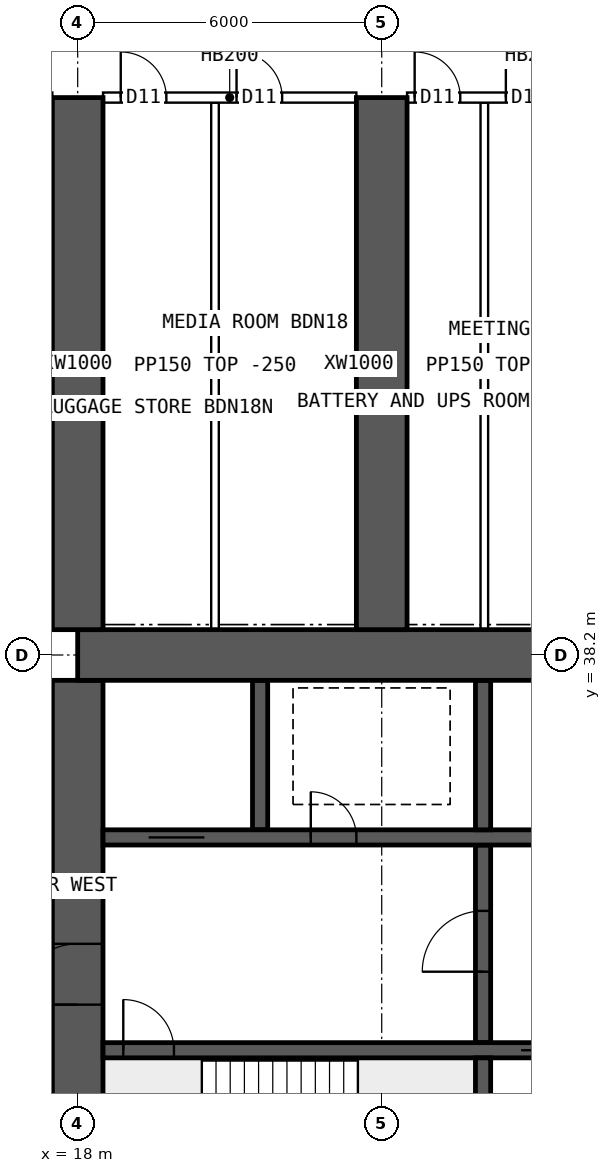
"""IFC4 building model, lengths in metres.
Left out: names, types, materials, properties, quantities, classifications, styles, units other than length and angle.
Written with IfcOpenShell. Run it as: python <this file> out.ifc"""

import sys

from ifc_helpers import new_model, si_unit, direction, frame, frame_2d, origin, place, context, subcontext, project, spatial, rectangle, extrude, element, fill, save


model = new_model("IFC4")
c1 = context("Model", 3, precision=1e-05, world=origin(), true_north=direction((0.0, 1.0)))
c2 = subcontext(c1, "Body", "Model", "MODEL_VIEW")
j1 = project(units=[si_unit("LENGTHUNIT", "METRE"), si_unit("PLANEANGLEUNIT", "RADIAN")], contexts=[c1])
p1 = place(None, origin())
s1 = spatial("IfcSite", under=j1, at=p1, CompositionType="ELEMENT")
p2 = place(p1, origin())
s2 = spatial("IfcBuilding", under=s1, at=p2, CompositionType="ELEMENT")
p3 = place(p2, frame((0.0, 0.0, 16.0)))
s3 = spatial("IfcBuildingStorey", under=s2, at=p3, CompositionType="ELEMENT", Elevation=16.0)
p4 = place(p3, frame((18.0, 38.2, 0.0), z_axis=(0.0, 0.0, 1.0), x_axis=(1.0, 0.0, 0.0)))
e1 = element("IfcWall", 1, at=p4, inside=s3, PredefinedType="SHEAR", context=c2, shape_type="SweptSolid", body=[
    extrude(rectangle(XDim=48.0, YDim=1.0, at=frame_2d((24.0, 0.0))), origin(), (0.0, 0.0, 1.0), 4.2),
])
p5 = place(p3, frame((18.0, 26.3, 0.0), z_axis=(0.0, 0.0, 1.0), x_axis=(0.0, 1.0, 0.0)))
e2 = element("IfcWall", 2, at=p5, inside=s3, PredefinedType="SHEAR", context=c2, shape_type="SweptSolid", body=[
    extrude(rectangle(XDim=11.4, YDim=1.0, at=frame_2d((5.7, 0.0))), origin(), (0.0, 0.0, 1.0), 4.2),
])
p6 = place(p5, frame((5.0, 0.0, 0.0)))
e3 = element("IfcOpeningElement", 3, at=p6, cuts=e2, PredefinedType="OPENING", context=c2, shape_type="SweptSolid", body=[
    extrude(rectangle(XDim=1.2, YDim=2.1, at=frame_2d((0.6, 1.05))), frame((0.0, 0.51, 0.0), z_axis=(0.0, -1.0, 0.0), x_axis=(1.0, 0.0, 0.0)), (0.0, 0.0, 1.0), 1.02),
])
p7 = place(p3, frame((18.5, 30.4, 0.0), z_axis=(0.0, 0.0, 1.0), x_axis=(1.0, 0.0, 0.0)))
e4 = element("IfcWall", 4, at=p7, inside=s3, PredefinedType="SHEAR", context=c2, shape_type="SweptSolid", body=[
    extrude(rectangle(XDim=47.0, YDim=0.3, at=frame_2d((23.5, 0.0))), origin(), (0.0, 0.0, 1.0), 4.2),
])
p8 = place(p7, frame((0.4, 0.0, 0.0)))
e5 = element("IfcOpeningElement", 5, at=p8, cuts=e4, PredefinedType="OPENING", context=c2, shape_type="SweptSolid", body=[
    extrude(rectangle(XDim=1.0, YDim=2.1, at=frame_2d((0.5, 1.05))), frame((0.0, 0.16, 0.0), z_axis=(0.0, -1.0, 0.0), x_axis=(1.0, 0.0, 0.0)), (0.0, 0.0, 1.0), 0.32),
])
p9 = place(p7, frame((45.6, 0.0, 0.0)))
e6 = element("IfcOpeningElement", 6, at=p9, cuts=e4, PredefinedType="OPENING", context=c2, shape_type="SweptSolid", body=[
    extrude(rectangle(XDim=1.0, YDim=2.1, at=frame_2d((0.5, 1.05))), frame((0.0, 0.16, 0.0), z_axis=(0.0, -1.0, 0.0), x_axis=(1.0, 0.0, 0.0)), (0.0, 0.0, 1.0), 0.32),
])
p10 = place(p7, frame((8.25, 0.0, 0.0)))
e7 = element("IfcOpeningElement", 7, at=p10, cuts=e4, PredefinedType="OPENING", context=c2, shape_type="SweptSolid", body=[
    extrude(rectangle(XDim=1.1, YDim=2.1, at=frame_2d((0.55, 1.05))), frame((0.0, 0.16, 0.0), z_axis=(0.0, -1.0, 0.0), x_axis=(1.0, 0.0, 0.0)), (0.0, 0.0, 1.0), 0.32),
])
p11 = place(p7, frame((10.85, 0.0, 0.0)))
e8 = element("IfcOpeningElement", 8, at=p11, cuts=e4, PredefinedType="OPENING", context=c2, shape_type="SweptSolid", body=[
    extrude(rectangle(XDim=1.1, YDim=2.1, at=frame_2d((0.55, 1.05))), frame((0.0, 0.16, 0.0), z_axis=(0.0, -1.0, 0.0), x_axis=(1.0, 0.0, 0.0)), (0.0, 0.0, 1.0), 0.32),
])
p12 = place(p7, frame((13.45, 0.0, 0.0)))
e9 = element("IfcOpeningElement", 9, at=p12, cuts=e4, PredefinedType="OPENING", context=c2, shape_type="SweptSolid", body=[
    extrude(rectangle(XDim=1.1, YDim=2.1, at=frame_2d((0.55, 1.05))), frame((0.0, 0.16, 0.0), z_axis=(0.0, -1.0, 0.0), x_axis=(1.0, 0.0, 0.0)), (0.0, 0.0, 1.0), 0.32),
])
p13 = place(p7, frame((16.05, 0.0, 0.0)))
e10 = element("IfcOpeningElement", 10, at=p13, cuts=e4, PredefinedType="OPENING", context=c2, shape_type="SweptSolid", body=[
    extrude(rectangle(XDim=1.1, YDim=2.1, at=frame_2d((0.55, 1.05))), frame((0.0, 0.16, 0.0), z_axis=(0.0, -1.0, 0.0), x_axis=(1.0, 0.0, 0.0)), (0.0, 0.0, 1.0), 0.32),
])
p14 = place(p7, frame((30.117, 0.0, 0.0)))
e11 = element("IfcOpeningElement", 11, at=p14, cuts=e4, PredefinedType="OPENING", context=c2, shape_type="SweptSolid", body=[
    extrude(rectangle(XDim=1.1, YDim=2.1, at=frame_2d((0.55, 1.05))), frame((0.0, 0.16, 0.0), z_axis=(0.0, -1.0, 0.0), x_axis=(1.0, 0.0, 0.0)), (0.0, 0.0, 1.0), 0.32),
])
p15 = place(p7, frame((33.65, 0.0, 0.0)))
e12 = element("IfcOpeningElement", 12, at=p15, cuts=e4, PredefinedType="OPENING", context=c2, shape_type="SweptSolid", body=[
    extrude(rectangle(XDim=1.1, YDim=2.1, at=frame_2d((0.55, 1.05))), frame((0.0, 0.16, 0.0), z_axis=(0.0, -1.0, 0.0), x_axis=(1.0, 0.0, 0.0)), (0.0, 0.0, 1.0), 0.32),
])
p16 = place(p7, frame((37.183, 0.0, 0.0)))
e13 = element("IfcOpeningElement", 13, at=p16, cuts=e4, PredefinedType="OPENING", context=c2, shape_type="SweptSolid", body=[
    extrude(rectangle(XDim=1.1, YDim=2.1, at=frame_2d((0.55, 1.05))), frame((0.0, 0.16, 0.0), z_axis=(0.0, -1.0, 0.0), x_axis=(1.0, 0.0, 0.0)), (0.0, 0.0, 1.0), 0.32),
])
p17 = place(p3, frame((18.5, 34.6, 0.0), z_axis=(0.0, 0.0, 1.0), x_axis=(1.0, 0.0, 0.0)))
e14 = element("IfcWall", 14, at=p17, inside=s3, PredefinedType="SHEAR", context=c2, shape_type="SweptSolid", body=[
    extrude(rectangle(XDim=47.0, YDim=0.3, at=frame_2d((23.5, 0.0))), origin(), (0.0, 0.0, 1.0), 4.2),
])
p18 = place(p17, frame((0.9, 0.0, 0.0)))
e15 = element("IfcOpeningElement", 15, at=p18, cuts=e14, PredefinedType="OPENING", context=c2, shape_type="SweptSolid", body=[
    extrude(rectangle(XDim=1.1, YDim=2.1, at=frame_2d((0.55, 1.05))), frame((0.0, 0.16, 0.0), z_axis=(0.0, -1.0, 0.0), x_axis=(1.0, 0.0, 0.0)), (0.0, 0.0, 1.0), 0.32),
])
p19 = place(p17, frame((45.0, 0.0, 0.0)))
e16 = element("IfcOpeningElement", 16, at=p19, cuts=e14, PredefinedType="OPENING", context=c2, shape_type="SweptSolid", body=[
    extrude(rectangle(XDim=1.1, YDim=2.1, at=frame_2d((0.55, 1.05))), frame((0.0, 0.16, 0.0), z_axis=(0.0, -1.0, 0.0), x_axis=(1.0, 0.0, 0.0)), (0.0, 0.0, 1.0), 0.32),
])
p20 = place(p17, frame((4.1, 0.0, 0.0)))
e17 = element("IfcOpeningElement", 17, at=p20, cuts=e14, PredefinedType="OPENING", context=c2, shape_type="SweptSolid", body=[
    extrude(rectangle(XDim=0.9, YDim=2.1, at=frame_2d((0.45, 1.05))), frame((0.0, 0.16, 0.0), z_axis=(0.0, -1.0, 0.0), x_axis=(1.0, 0.0, 0.0)), (0.0, 0.0, 1.0), 0.32),
])
p21 = place(p17, frame((42.0, 0.0, 0.0)))
e18 = element("IfcOpeningElement", 18, at=p21, cuts=e14, PredefinedType="OPENING", context=c2, shape_type="SweptSolid", body=[
    extrude(rectangle(XDim=0.9, YDim=2.1, at=frame_2d((0.45, 1.05))), frame((0.0, 0.16, 0.0), z_axis=(0.0, -1.0, 0.0), x_axis=(1.0, 0.0, 0.0)), (0.0, 0.0, 1.0), 0.32),
])
p22 = place(p17, frame((8.875, 0.0, 0.0)))
e19 = element("IfcOpeningElement", 19, at=p22, cuts=e14, PredefinedType="OPENING", context=c2, shape_type="SweptSolid", body=[
    extrude(rectangle(XDim=0.9, YDim=2.1, at=frame_2d((0.45, 1.05))), frame((0.0, 0.16, 0.0), z_axis=(0.0, -1.0, 0.0), x_axis=(1.0, 0.0, 0.0)), (0.0, 0.0, 1.0), 0.32),
])
p23 = place(p17, frame((12.849, 0.0, 0.0)))
e20 = element("IfcOpeningElement", 20, at=p23, cuts=e14, PredefinedType="OPENING", context=c2, shape_type="SweptSolid", body=[
    extrude(rectangle(XDim=0.9, YDim=2.1, at=frame_2d((0.45, 1.05))), frame((0.0, 0.16, 0.0), z_axis=(0.0, -1.0, 0.0), x_axis=(1.0, 0.0, 0.0)), (0.0, 0.0, 1.0), 0.32),
])
p24 = place(p17, frame((16.496, 0.0, 0.0)))
e21 = element("IfcOpeningElement", 21, at=p24, cuts=e14, PredefinedType="OPENING", context=c2, shape_type="SweptSolid", body=[
    extrude(rectangle(XDim=0.9, YDim=2.1, at=frame_2d((0.45, 1.05))), frame((0.0, 0.16, 0.0), z_axis=(0.0, -1.0, 0.0), x_axis=(1.0, 0.0, 0.0)), (0.0, 0.0, 1.0), 0.32),
])
p25 = place(p17, frame((20.255, 0.0, 0.0)))
e22 = element("IfcOpeningElement", 22, at=p25, cuts=e14, PredefinedType="OPENING", context=c2, shape_type="SweptSolid", body=[
    extrude(rectangle(XDim=0.9, YDim=2.1, at=frame_2d((0.45, 1.05))), frame((0.0, 0.16, 0.0), z_axis=(0.0, -1.0, 0.0), x_axis=(1.0, 0.0, 0.0)), (0.0, 0.0, 1.0), 0.32),
])
p26 = place(p17, frame((24.661, 0.0, 0.0)))
e23 = element("IfcOpeningElement", 23, at=p26, cuts=e14, PredefinedType="OPENING", context=c2, shape_type="SweptSolid", body=[
    extrude(rectangle(XDim=0.9, YDim=2.1, at=frame_2d((0.45, 1.05))), frame((0.0, 0.16, 0.0), z_axis=(0.0, -1.0, 0.0), x_axis=(1.0, 0.0, 0.0)), (0.0, 0.0, 1.0), 0.32),
])
p27 = place(p17, frame((27.458, 0.0, 0.0)))
e24 = element("IfcOpeningElement", 24, at=p27, cuts=e14, PredefinedType="OPENING", context=c2, shape_type="SweptSolid", body=[
    extrude(rectangle(XDim=0.9, YDim=2.1, at=frame_2d((0.45, 1.05))), frame((0.0, 0.16, 0.0), z_axis=(0.0, -1.0, 0.0), x_axis=(1.0, 0.0, 0.0)), (0.0, 0.0, 1.0), 0.32),
])
p28 = place(p17, frame((29.831, 0.0, 0.0)))
e25 = element("IfcOpeningElement", 25, at=p28, cuts=e14, PredefinedType="OPENING", context=c2, shape_type="SweptSolid", body=[
    extrude(rectangle(XDim=0.9, YDim=2.1, at=frame_2d((0.45, 1.05))), frame((0.0, 0.16, 0.0), z_axis=(0.0, -1.0, 0.0), x_axis=(1.0, 0.0, 0.0)), (0.0, 0.0, 1.0), 0.32),
])
p29 = place(p17, frame((35.302, 0.0, 0.0)))
e26 = element("IfcOpeningElement", 26, at=p29, cuts=e14, PredefinedType="OPENING", context=c2, shape_type="SweptSolid", body=[
    extrude(rectangle(XDim=0.9, YDim=2.1, at=frame_2d((0.45, 1.05))), frame((0.0, 0.16, 0.0), z_axis=(0.0, -1.0, 0.0), x_axis=(1.0, 0.0, 0.0)), (0.0, 0.0, 1.0), 0.32),
])
p30 = place(p3, frame((26.0, 26.3, 0.0), z_axis=(0.0, 0.0, 1.0), x_axis=(0.0, 1.0, 0.0)))
e27 = element("IfcWall", 27, at=p30, inside=s3, PredefinedType="SHEAR", context=c2, shape_type="SweptSolid", body=[
    extrude(rectangle(XDim=3.95, YDim=0.3, at=frame_2d((1.975, 0.0))), origin(), (0.0, 0.0, 1.0), 4.2),
])
p31 = place(p3, frame((26.0, 30.55, 0.0), z_axis=(0.0, 0.0, 1.0), x_axis=(0.0, 1.0, 0.0)))
e28 = element("IfcWall", 28, at=p31, inside=s3, PredefinedType="SHEAR", context=c2, shape_type="SweptSolid", body=[
    extrude(rectangle(XDim=3.9, YDim=0.3, at=frame_2d((1.95, 0.0))), origin(), (0.0, 0.0, 1.0), 4.2),
])
p32 = place(p31, frame((1.4, 0.0, 0.0)))
e29 = element("IfcOpeningElement", 29, at=p32, cuts=e28, PredefinedType="OPENING", context=c2, shape_type="SweptSolid", body=[
    extrude(rectangle(XDim=1.2, YDim=2.1, at=frame_2d((0.6, 1.05))), frame((0.0, 0.16, 0.0), z_axis=(0.0, -1.0, 0.0), x_axis=(1.0, 0.0, 0.0)), (0.0, 0.0, 1.0), 0.32),
])
for number, where, z_axis, x_axis in (
    (30, (21.6, 34.75, 0.0), (0.0, 0.0, 1.0), (0.0, 1.0, 0.0)),
    (31, (26.0, 34.75, 0.0), (0.0, 0.0, 1.0), (0.0, 1.0, 0.0)),
):
    element("IfcWall", number, at=place(p3, frame(where, z_axis=z_axis, x_axis=x_axis)), inside=s3, PredefinedType="SHEAR", context=c2, shape_type="SweptSolid", body=[
        extrude(rectangle(XDim=2.95, YDim=0.3, at=frame_2d((1.475, 0.0))), origin(), (0.0, 0.0, 1.0), 4.2),
    ])
for number, where, z_axis, x_axis in (
    (32, (18.0, 38.7, 0.0), (0.0, 0.0, 1.0), (0.0, 1.0, 0.0)),
    (33, (24.0, 38.7, 0.0), (0.0, 0.0, 1.0), (0.0, 1.0, 0.0)),
):
    element("IfcWall", number, at=place(p3, frame(where, z_axis=z_axis, x_axis=x_axis)), inside=s3, PredefinedType="SHEAR", context=c2, shape_type="SweptSolid", body=[
        extrude(rectangle(XDim=10.5, YDim=1.0, at=frame_2d((5.25, 0.0))), origin(), (0.0, 0.0, 1.0), 4.2),
    ])
p33 = place(p3, frame((18.5, 49.2, 0.0), z_axis=(0.0, 0.0, 1.0), x_axis=(1.0, 0.0, 0.0)))
e34 = element("IfcWall", 34, at=p33, inside=s3, PredefinedType="SOLIDWALL", context=c2, shape_type="SweptSolid", body=[
    extrude(rectangle(XDim=5.0, YDim=0.2, at=frame_2d((2.5, 0.0))), origin(), (0.0, 0.0, 1.0), 3.95),
])
p34 = place(p33, frame((0.35, 0.0, 0.0)))
e35 = element("IfcOpeningElement", 35, at=p34, cuts=e34, PredefinedType="OPENING", context=c2, shape_type="SweptSolid", body=[
    extrude(rectangle(XDim=0.9, YDim=2.1, at=frame_2d((0.45, 1.05))), frame((0.0, 0.11, 0.0), z_axis=(0.0, -1.0, 0.0), x_axis=(1.0, 0.0, 0.0)), (0.0, 0.0, 1.0), 0.22),
])
p35 = place(p33, frame((2.635, 0.0, 0.0)))
e36 = element("IfcOpeningElement", 36, at=p35, cuts=e34, PredefinedType="OPENING", context=c2, shape_type="SweptSolid", body=[
    extrude(rectangle(XDim=0.9, YDim=2.1, at=frame_2d((0.45, 1.05))), frame((0.0, 0.11, 0.0), z_axis=(0.0, -1.0, 0.0), x_axis=(1.0, 0.0, 0.0)), (0.0, 0.0, 1.0), 0.22),
])
p36 = place(p3, frame((24.5, 49.2, 0.0), z_axis=(0.0, 0.0, 1.0), x_axis=(1.0, 0.0, 0.0)))
e37 = element("IfcWall", 37, at=p36, inside=s3, PredefinedType="SOLIDWALL", context=c2, shape_type="SweptSolid", body=[
    extrude(rectangle(XDim=5.0, YDim=0.2, at=frame_2d((2.5, 0.0))), origin(), (0.0, 0.0, 1.0), 3.95),
])
p37 = place(p36, frame((0.15, 0.0, 0.0)))
e38 = element("IfcOpeningElement", 38, at=p37, cuts=e37, PredefinedType="OPENING", context=c2, shape_type="SweptSolid", body=[
    extrude(rectangle(XDim=0.9, YDim=2.1, at=frame_2d((0.45, 1.05))), frame((0.0, 0.11, 0.0), z_axis=(0.0, -1.0, 0.0), x_axis=(1.0, 0.0, 0.0)), (0.0, 0.0, 1.0), 0.22),
])
p38 = place(p36, frame((1.95, 0.0, 0.0)))
e39 = element("IfcOpeningElement", 39, at=p38, cuts=e37, PredefinedType="OPENING", context=c2, shape_type="SweptSolid", body=[
    extrude(rectangle(XDim=0.9, YDim=2.1, at=frame_2d((0.45, 1.05))), frame((0.0, 0.11, 0.0), z_axis=(0.0, -1.0, 0.0), x_axis=(1.0, 0.0, 0.0)), (0.0, 0.0, 1.0), 0.22),
])
for number, where, z_axis, x_axis in (
    (40, (20.71, 38.7, 0.0), (0.0, 0.0, 1.0), (0.0, 1.0, 0.0)),
    (41, (26.025, 38.7, 0.0), (0.0, 0.0, 1.0), (0.0, 1.0, 0.0)),
):
    element("IfcWall", number, at=place(p3, frame(where, z_axis=z_axis, x_axis=x_axis)), inside=s3, PredefinedType="PARTITIONING", context=c2, shape_type="SweptSolid", body=[
        extrude(rectangle(XDim=10.4, YDim=0.15, at=frame_2d((5.2, 0.0))), origin(), (0.0, 0.0, 1.0), 3.95),
    ])
p39 = place(p6, origin())
e42 = element("IfcDoor", 42, at=p39, inside=s3, OperationType="SINGLE_SWING_LEFT", PredefinedType="DOOR", context=c2, shape_type="SweptSolid", body=[
    extrude(rectangle(XDim=1.2, YDim=2.1, at=frame_2d((0.6, 1.05))), frame((0.0, 0.025, 0.0), z_axis=(0.0, -1.0, 0.0), x_axis=(1.0, 0.0, 0.0)), (0.0, 0.0, 1.0), 0.05),
])
fill(e3, e42)
p40 = place(p8, origin())
e43 = element("IfcDoor", 43, at=p40, inside=s3, OperationType="SINGLE_SWING_LEFT", PredefinedType="DOOR", context=c2, shape_type="SweptSolid", body=[
    extrude(rectangle(XDim=1.0, YDim=2.1, at=frame_2d((0.5, 1.05))), frame((0.0, 0.025, 0.0), z_axis=(0.0, -1.0, 0.0), x_axis=(1.0, 0.0, 0.0)), (0.0, 0.0, 1.0), 0.05),
])
fill(e5, e43)
p41 = place(p18, origin())
e44 = element("IfcDoor", 44, at=p41, inside=s3, OperationType="DOUBLE_DOOR_SLIDING", PredefinedType="DOOR", context=c2, shape_type="SweptSolid", body=[
    extrude(rectangle(XDim=1.1, YDim=2.1, at=frame_2d((0.55, 1.05))), frame((0.0, 0.025, 0.0), z_axis=(0.0, -1.0, 0.0), x_axis=(1.0, 0.0, 0.0)), (0.0, 0.0, 1.0), 0.05),
])
fill(e15, e44)
p42 = place(p20, origin())
e45 = element("IfcDoor", 45, at=p42, inside=s3, OperationType="SINGLE_SWING_LEFT", PredefinedType="DOOR", context=c2, shape_type="SweptSolid", body=[
    extrude(rectangle(XDim=0.9, YDim=2.1, at=frame_2d((0.45, 1.05))), frame((0.0, 0.025, 0.0), z_axis=(0.0, -1.0, 0.0), x_axis=(1.0, 0.0, 0.0)), (0.0, 0.0, 1.0), 0.05),
])
fill(e17, e45)
p43 = place(p32, origin())
e46 = element("IfcDoor", 46, at=p43, inside=s3, OperationType="SINGLE_SWING_LEFT", PredefinedType="DOOR", context=c2, shape_type="SweptSolid", body=[
    extrude(rectangle(XDim=1.2, YDim=2.1, at=frame_2d((0.6, 1.05))), frame((0.0, 0.025, 0.0), z_axis=(0.0, -1.0, 0.0), x_axis=(1.0, 0.0, 0.0)), (0.0, 0.0, 1.0), 0.05),
])
fill(e29, e46)
p44 = place(p10, origin())
e47 = element("IfcDoor", 47, at=p44, inside=s3, OperationType="DOUBLE_DOOR_SLIDING", PredefinedType="DOOR", context=c2, shape_type="SweptSolid", body=[
    extrude(rectangle(XDim=1.1, YDim=2.1, at=frame_2d((0.55, 1.05))), frame((0.0, 0.025, 0.0), z_axis=(0.0, -1.0, 0.0), x_axis=(1.0, 0.0, 0.0)), (0.0, 0.0, 1.0), 0.05),
])
fill(e7, e47)
p45 = place(p34, origin())
e48 = element("IfcDoor", 48, at=p45, inside=s3, OperationType="SINGLE_SWING_LEFT", PredefinedType="DOOR", context=c2, shape_type="SweptSolid", body=[
    extrude(rectangle(XDim=0.9, YDim=2.1, at=frame_2d((0.45, 1.05))), frame((0.0, 0.025, 0.0), z_axis=(0.0, -1.0, 0.0), x_axis=(1.0, 0.0, 0.0)), (0.0, 0.0, 1.0), 0.05),
])
fill(e35, e48)
p46 = place(p35, origin())
e49 = element("IfcDoor", 49, at=p46, inside=s3, OperationType="SINGLE_SWING_LEFT", PredefinedType="DOOR", context=c2, shape_type="SweptSolid", body=[
    extrude(rectangle(XDim=0.9, YDim=2.1, at=frame_2d((0.45, 1.05))), frame((0.0, 0.025, 0.0), z_axis=(0.0, -1.0, 0.0), x_axis=(1.0, 0.0, 0.0)), (0.0, 0.0, 1.0), 0.05),
])
fill(e36, e49)
p47 = place(p37, origin())
e50 = element("IfcDoor", 50, at=p47, inside=s3, OperationType="SINGLE_SWING_LEFT", PredefinedType="DOOR", context=c2, shape_type="SweptSolid", body=[
    extrude(rectangle(XDim=0.9, YDim=2.1, at=frame_2d((0.45, 1.05))), frame((0.0, 0.025, 0.0), z_axis=(0.0, -1.0, 0.0), x_axis=(1.0, 0.0, 0.0)), (0.0, 0.0, 1.0), 0.05),
])
fill(e38, e50)
p48 = place(p38, origin())
e51 = element("IfcDoor", 51, at=p48, inside=s3, OperationType="SINGLE_SWING_LEFT", PredefinedType="DOOR", context=c2, shape_type="SweptSolid", body=[
    extrude(rectangle(XDim=0.9, YDim=2.1, at=frame_2d((0.45, 1.05))), frame((0.0, 0.025, 0.0), z_axis=(0.0, -1.0, 0.0), x_axis=(1.0, 0.0, 0.0)), (0.0, 0.0, 1.0), 0.05),
])
fill(e39, e51)
save(model, sys.argv[1])
